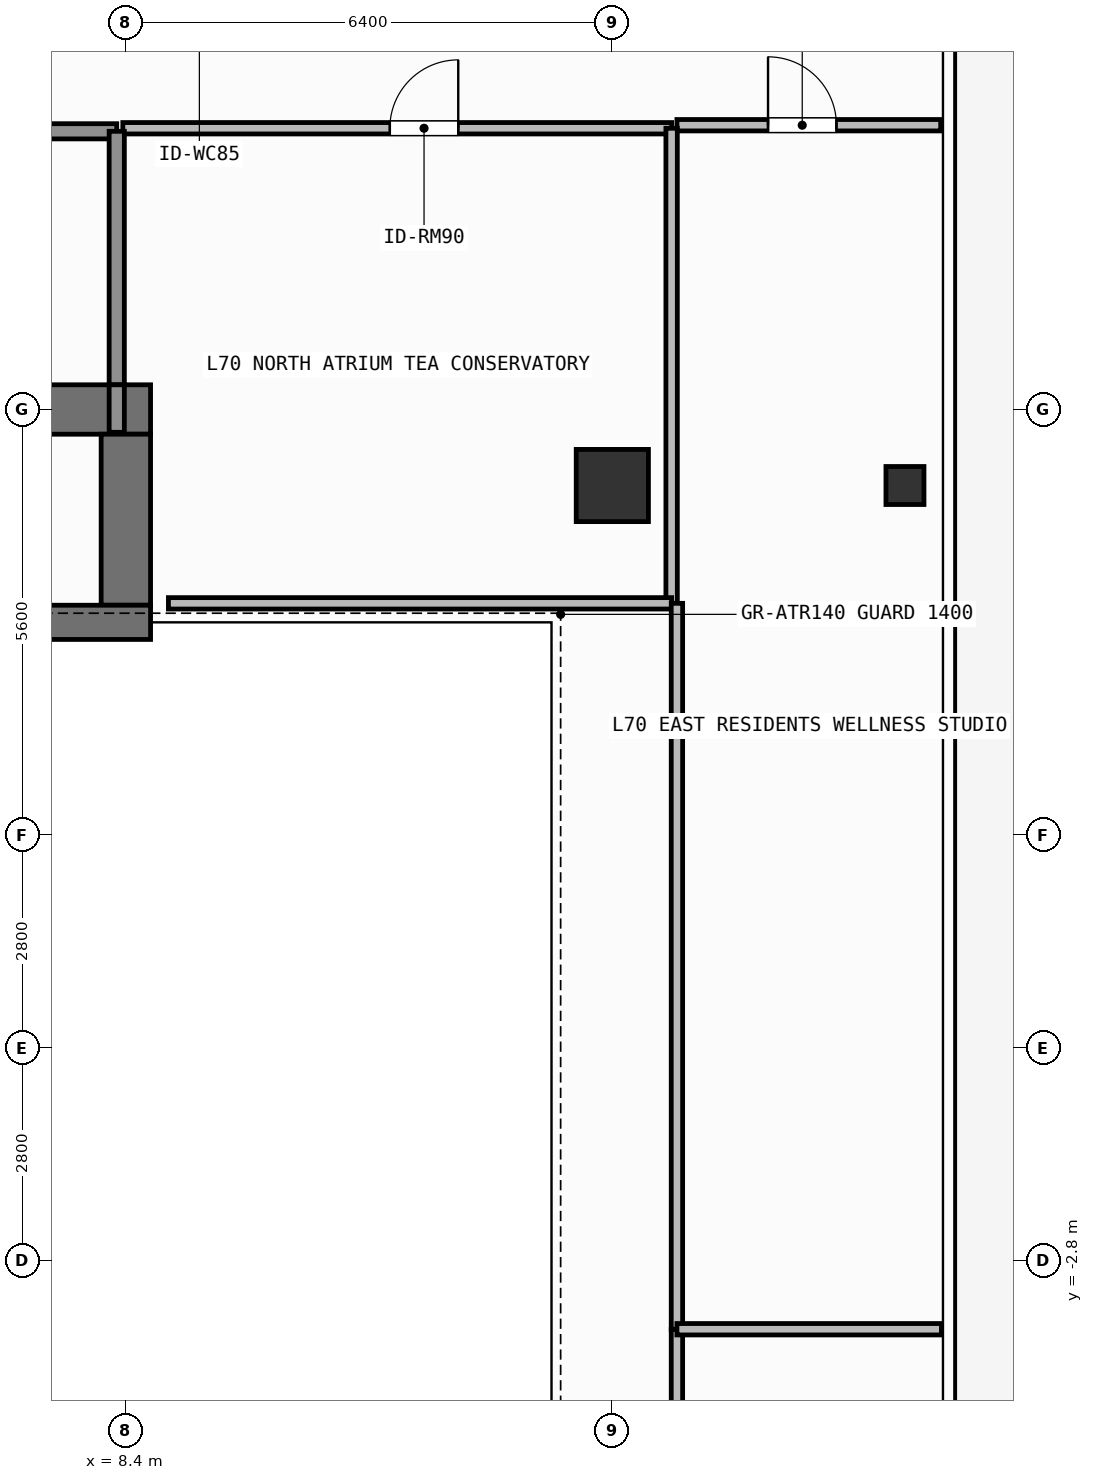
"""IFC4 building model, lengths in metres.
Left out: names, types, materials, properties, quantities, classifications, styles, units other than length and angle.
Written with IfcOpenShell. Run it as: python <this file> out.ifc"""

import sys

from ifc_helpers import new_model, si_unit, direction, frame, frame_2d, origin, origin_2d, place, context, subcontext, project, spatial, rectangle, hollow_rectangle, extrude, element, fill, save


model = new_model("IFC4")
c1 = context("Model", 3, precision=1e-05, world=origin(), true_north=direction((0.0, 1.0)))
c2 = subcontext(c1, "Body", "Model", "MODEL_VIEW")
j1 = project(units=[si_unit("LENGTHUNIT", "METRE"), si_unit("PLANEANGLEUNIT", "RADIAN")], contexts=[c1])
p1 = place(None, origin())
s1 = spatial("IfcSite", under=j1, at=p1, CompositionType="ELEMENT")
p2 = place(p1, origin())
s2 = spatial("IfcBuilding", under=s1, at=p2, CompositionType="ELEMENT")
p3 = place(p2, frame((0.0, 0.0, 285.9)))
s3 = spatial("IfcBuildingStorey", under=s2, at=p3, CompositionType="ELEMENT", Elevation=285.9)
p4 = place(p3, frame((-7.55, 8.4, 0.0), z_axis=(0.0, 0.0, 1.0), x_axis=(1.0, 0.0, 0.0)))
e1 = element("IfcWall", 1, at=p4, inside=s3, PredefinedType="SHEAR", context=c2, shape_type="SweptSolid", body=[
    extrude(rectangle(XDim=16.275, YDim=0.65, at=frame_2d((8.138, 0.0))), origin(), (0.0, 0.0, 1.0), 3.9),
])
p5 = place(p3, frame((8.4, 5.825, 0.0), z_axis=(0.0, 0.0, 1.0), x_axis=(0.0, 1.0, 0.0)))
e2 = element("IfcWall", 2, at=p5, inside=s3, PredefinedType="SHEAR", context=c2, shape_type="SweptSolid", body=[
    extrude(rectangle(XDim=2.25, YDim=0.65, at=frame_2d((1.125, 0.0))), origin(), (0.0, 0.0, 1.0), 3.9),
])
p6 = place(p3, frame((3.045, 5.6, 0.0), z_axis=(0.0, 0.0, 1.0), x_axis=(1.0, 0.0, 0.0)))
e3 = element("IfcWall", 3, at=p6, inside=s3, PredefinedType="SHEAR", context=c2, shape_type="SweptSolid", body=[
    extrude(rectangle(XDim=5.68, YDim=0.45, at=frame_2d((2.84, 0.0))), origin(), (0.0, 0.0, 1.0), 3.9),
])
p7 = place(p3, frame((14.8, 7.4, 0.0), z_axis=(0.0, 0.0, 1.0), x_axis=(1.0, 0.0, 0.0)))
e4 = element("IfcColumn", 4, at=p7, inside=s3, PredefinedType="COLUMN", context=c2, shape_type="SweptSolid", body=[
    extrude(rectangle(XDim=0.95, YDim=0.95, at=origin_2d()), origin(), (0.0, 0.0, 1.0), 3.9),
])
p8 = place(p3, frame((18.65, 7.4, 0.0), z_axis=(0.0, 0.0, 1.0), x_axis=(1.0, 0.0, 0.0)))
e5 = element("IfcColumn", 5, at=p8, inside=s3, PredefinedType="COLUMN", context=c2, shape_type="SweptSolid", body=[
    extrude(hollow_rectangle(XDim=0.5, YDim=0.5, WallThickness=0.025, at=origin_2d()), origin(), (0.0, 0.0, 1.0), 3.9),
])
p9 = place(p3, frame((4.58, 12.06, 0.0), z_axis=(0.0, 0.0, 1.0), x_axis=(1.0, 0.0, 0.0)))
e6 = element("IfcWall", 6, at=p9, inside=s3, PredefinedType="SOLIDWALL", context=c2, shape_type="SweptSolid", body=[
    extrude(rectangle(XDim=3.7, YDim=0.2, at=frame_2d((1.85, 0.0))), origin(), (0.0, 0.0, 1.0), 3.68),
])
p10 = place(p9, frame((1.212, 0.0, 0.0)))
e7 = element("IfcOpeningElement", 7, at=p10, cuts=e6, PredefinedType="OPENING", context=c2, shape_type="SweptSolid", body=[
    extrude(rectangle(XDim=1.1, YDim=2.15, at=frame_2d((0.55, 1.075))), frame((0.0, 0.11, 0.0), z_axis=(0.0, -1.0, 0.0), x_axis=(1.0, 0.0, 0.0)), (0.0, 0.0, 1.0), 0.22),
])
p11 = place(p3, frame((8.36, 12.1, 0.0), z_axis=(0.0, 0.0, 1.0), x_axis=(1.0, 0.0, 0.0)))
e8 = element("IfcWall", 8, at=p11, inside=s3, PredefinedType="PARTITIONING", context=c2, shape_type="SweptSolid", body=[
    extrude(rectangle(XDim=7.22, YDim=0.15, at=frame_2d((3.61, 0.0))), origin(), (0.0, 0.0, 1.0), 3.68),
])
p12 = place(p11, frame((3.513, 0.0, 0.0)))
e9 = element("IfcOpeningElement", 9, at=p12, cuts=e8, PredefinedType="OPENING", context=c2, shape_type="SweptSolid", body=[
    extrude(rectangle(XDim=0.9, YDim=2.1, at=frame_2d((0.45, 1.05))), frame((0.0, 0.085, 0.0), z_axis=(0.0, -1.0, 0.0), x_axis=(1.0, 0.0, 0.0)), (0.0, 0.0, 1.0), 0.17),
])
p13 = place(p3, frame((15.65, 12.14, 0.0), z_axis=(0.0, 0.0, 1.0), x_axis=(1.0, 0.0, 0.0)))
e10 = element("IfcWall", 10, at=p13, inside=s3, PredefinedType="PARTITIONING", context=c2, shape_type="SweptSolid", body=[
    extrude(rectangle(XDim=3.47, YDim=0.15, at=frame_2d((1.735, 0.0))), origin(), (0.0, 0.0, 1.0), 3.68),
])
p14 = place(p13, frame((1.198, 0.0, 0.0)))
e11 = element("IfcOpeningElement", 11, at=p14, cuts=e10, PredefinedType="OPENING", context=c2, shape_type="SweptSolid", body=[
    extrude(rectangle(XDim=0.9, YDim=2.1, at=frame_2d((0.45, 1.05))), frame((0.0, 0.085, 0.0), z_axis=(0.0, -1.0, 0.0), x_axis=(1.0, 0.0, 0.0)), (0.0, 0.0, 1.0), 0.17),
])
p15 = place(p3, frame((8.28, 8.725, 0.0), z_axis=(0.0, 0.0, 1.0), x_axis=(0.0, 1.0, 0.0)))
e12 = element("IfcWall", 12, at=p15, inside=s3, PredefinedType="SOLIDWALL", context=c2, shape_type="SweptSolid", body=[
    extrude(rectangle(XDim=3.335, YDim=0.2, at=frame_2d((1.667, 0.0))), origin(), (0.0, 0.0, 1.0), 3.68),
])
p16 = place(p3, frame((8.28, 8.1, 0.0), z_axis=(0.0, 0.0, 1.0), x_axis=(0.0, 1.0, 0.0)))
e13 = element("IfcWall", 13, at=p16, inside=s3, PredefinedType="SOLIDWALL", context=c2, shape_type="SweptSolid", body=[
    extrude(rectangle(XDim=0.625, YDim=0.2, at=frame_2d((0.312, 0.0))), origin(), (0.0, 0.0, 1.0), 3.68),
])
p17 = place(p3, frame((15.58, 5.85, 0.0), z_axis=(0.0, 0.0, 1.0), x_axis=(0.0, 1.0, 0.0)))
e14 = element("IfcWall", 14, at=p17, inside=s3, PredefinedType="PARTITIONING", context=c2, shape_type="SweptSolid", body=[
    extrude(rectangle(XDim=6.25, YDim=0.15, at=frame_2d((3.125, 0.0))), origin(), (0.0, 0.0, 1.0), 3.68),
])
p18 = place(p3, frame((8.96, 5.85, 0.0), z_axis=(0.0, 0.0, 1.0), x_axis=(1.0, 0.0, 0.0)))
e15 = element("IfcWall", 15, at=p18, inside=s3, PredefinedType="PARTITIONING", context=c2, shape_type="SweptSolid", body=[
    extrude(rectangle(XDim=6.62, YDim=0.15, at=frame_2d((3.31, 0.0))), origin(), (0.0, 0.0, 1.0), 3.68),
])
p19 = place(p3, frame((15.65, -5.85, 0.0), z_axis=(0.0, 0.0, 1.0), x_axis=(0.0, 1.0, 0.0)))
e16 = element("IfcWall", 16, at=p19, inside=s3, PredefinedType="PARTITIONING", context=c2, shape_type="SweptSolid", body=[
    extrude(rectangle(XDim=2.15, YDim=0.15, at=frame_2d((1.075, 0.0))), origin(), (0.0, 0.0, 1.0), 3.68),
])
p20 = place(p3, frame((15.65, -3.7, 0.0), z_axis=(0.0, 0.0, 1.0), x_axis=(0.0, 1.0, 0.0)))
e17 = element("IfcWall", 17, at=p20, inside=s3, PredefinedType="PARTITIONING", context=c2, shape_type="SweptSolid", body=[
    extrude(rectangle(XDim=9.55, YDim=0.15, at=frame_2d((4.775, 0.0))), origin(), (0.0, 0.0, 1.0), 3.68),
])
p21 = place(p3, frame((15.65, -3.7, 0.0), z_axis=(0.0, 0.0, 1.0), x_axis=(1.0, 0.0, 0.0)))
e18 = element("IfcWall", 18, at=p21, inside=s3, PredefinedType="PARTITIONING", context=c2, shape_type="SweptSolid", body=[
    extrude(rectangle(XDim=3.48, YDim=0.15, at=frame_2d((1.74, 0.0))), origin(), (0.0, 0.0, 1.0), 3.68),
])
p22 = place(p12, origin())
e19 = element("IfcDoor", 19, at=p22, inside=s3, OperationType="SINGLE_SWING_RIGHT", PredefinedType="DOOR", context=c2, shape_type="SweptSolid", body=[
    extrude(rectangle(XDim=0.9, YDim=2.1, at=frame_2d((0.45, 1.05))), frame((0.0, 0.025, 0.0), z_axis=(0.0, -1.0, 0.0), x_axis=(1.0, 0.0, 0.0)), (0.0, 0.0, 1.0), 0.05),
])
fill(e9, e19)
p23 = place(p14, origin())
e20 = element("IfcDoor", 20, at=p23, inside=s3, OperationType="SINGLE_SWING_LEFT", PredefinedType="DOOR", context=c2, shape_type="SweptSolid", body=[
    extrude(rectangle(XDim=0.9, YDim=2.1, at=frame_2d((0.45, 1.05))), frame((0.0, 0.025, 0.0), z_axis=(0.0, -1.0, 0.0), x_axis=(1.0, 0.0, 0.0)), (0.0, 0.0, 1.0), 0.05),
])
fill(e11, e20)
save(model, sys.argv[1])
